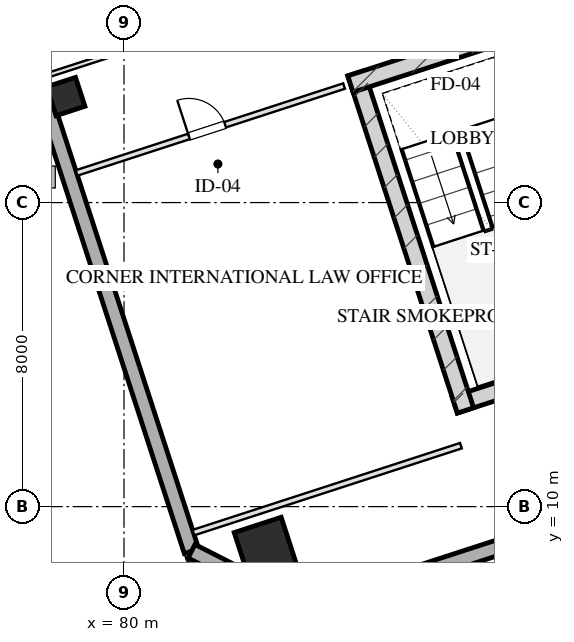
"""IFC4 building model, lengths in metres.
Left out: names, types, materials, properties, quantities, classifications, styles, units other than length and angle.
Written with IfcOpenShell. Run it as: python <this file> out.ifc"""

import sys

from ifc_helpers import new_model, si_unit, direction, frame, frame_2d, origin, origin_2d, place, context, subcontext, project, spatial, rectangle, hollow_rectangle, extrude, element, fill, save


model = new_model("IFC4")
c1 = context("Model", 3, precision=1e-05, world=origin(), true_north=direction((0.0, 1.0)))
c2 = subcontext(c1, "Body", "Model", "MODEL_VIEW")
j1 = project(units=[si_unit("LENGTHUNIT", "METRE"), si_unit("PLANEANGLEUNIT", "RADIAN")], contexts=[c1])
p1 = place(None, origin())
s1 = spatial("IfcSite", under=j1, at=p1, CompositionType="ELEMENT")
p2 = place(p1, origin())
s2 = spatial("IfcBuilding", under=s1, at=p2, CompositionType="ELEMENT")
p3 = place(p2, frame((0.0, 0.0, 195.5)))
s3 = spatial("IfcBuildingStorey", under=s2, at=p3, CompositionType="ELEMENT", Elevation=195.5)
p4 = place(p3, frame((88.701, 12.675, 0.0), z_axis=(0.0, 0.0, 1.0), x_axis=(0.95105824505, 0.309011673763, 0.0)))
e1 = element("IfcWall", 1, at=p4, inside=s3, PredefinedType="SHEAR", context=c2, shape_type="SweptSolid", body=[
    extrude(rectangle(XDim=16.25, YDim=0.45, at=frame_2d((8.125, 0.0))), origin(), (0.0, 0.0, 1.0), 3.45),
])
p5 = place(p3, frame((86.102, 21.404, 0.0), z_axis=(0.0, 0.0, 1.0), x_axis=(0.309035778627, -0.951050412717, 0.0)))
e2 = element("IfcWall", 2, at=p5, inside=s3, PredefinedType="SHEAR", context=c2, shape_type="SweptSolid", body=[
    extrude(rectangle(XDim=9.33, YDim=0.45, at=frame_2d((4.665, 0.0))), origin(), (0.0, 0.0, 1.0), 3.45),
])
p6 = place(p3, frame((85.957, 21.12, 0.0), z_axis=(0.0, 0.0, 1.0), x_axis=(0.951064796122, 0.308991510526, 0.0)))
e3 = element("IfcWall", 3, at=p6, inside=s3, PredefinedType="SHEAR", context=c2, shape_type="SweptSolid", body=[
    extrude(rectangle(XDim=4.145, YDim=0.45, at=frame_2d((2.073, 0.0))), origin(), (0.0, 0.0, 1.0), 3.45),
])
p7 = place(p3, frame((83.719, 8.901, 0.0), z_axis=(0.0, 0.0, 1.0), x_axis=(0.951056516295, 0.309016994375, 0.0)))
e4 = element("IfcColumn", 4, at=p7, inside=s3, PredefinedType="COLUMN", context=c2, shape_type="SweptSolid", body=[
    extrude(hollow_rectangle(XDim=1.3, YDim=1.3, WallThickness=0.045, at=origin_2d()), origin(), (0.0, 0.0, 1.0), 3.451),
])
p8 = place(p3, frame((78.468, 20.79, 0.0), z_axis=(0.0, 0.0, 1.0), x_axis=(0.951056516295, 0.309016994375, 0.0)))
e5 = element("IfcColumn", 5, at=p8, inside=s3, PredefinedType="COLUMN", context=c2, shape_type="SweptSolid", body=[
    extrude(hollow_rectangle(XDim=0.8, YDim=0.8, WallThickness=0.028, at=origin_2d()), origin(), (0.0, 0.0, 1.0), 3.451),
])
p9 = place(p3, frame((81.776, 8.827, 0.0), z_axis=(0.0, 0.0, 1.0), x_axis=(-0.309014228706, 0.951057414911, 0.0)))
e6 = element("IfcWall", 6, at=p9, inside=s3, PredefinedType="SOLIDWALL", context=c2, shape_type="SweptSolid", body=[
    extrude(rectangle(XDim=42.8, YDim=0.4, at=frame_2d((21.4, 0.0))), origin(), (0.0, 0.0, 1.0), 2.61),
])
p10 = place(p9, frame((22.95, 0.0, 0.75)))
e7 = element("IfcOpeningElement", 7, at=p10, cuts=e6, PredefinedType="OPENING", context=c2, shape_type="SweptSolid", body=[
    extrude(rectangle(XDim=2.1, YDim=1.46, at=frame_2d((1.05, 0.73))), frame((0.0, 0.21, 0.0), z_axis=(0.0, -1.0, 0.0), x_axis=(1.0, 0.0, 0.0)), (0.0, 0.0, 1.0), 0.42),
])
p11 = place(p9, frame((26.75, 0.0, 0.75)))
e8 = element("IfcOpeningElement", 8, at=p11, cuts=e6, PredefinedType="OPENING", context=c2, shape_type="SweptSolid", body=[
    extrude(rectangle(XDim=2.1, YDim=1.46, at=frame_2d((1.05, 0.73))), frame((0.0, 0.21, 0.0), z_axis=(0.0, -1.0, 0.0), x_axis=(1.0, 0.0, 0.0)), (0.0, 0.0, 1.0), 0.42),
])
p12 = place(p9, frame((17.787, 0.0, 0.0)))
e9 = element("IfcOpeningElement", 9, at=p12, cuts=e6, PredefinedType="OPENING", context=c2, shape_type="SweptSolid", body=[
    extrude(rectangle(XDim=1.1, YDim=2.15, at=frame_2d((0.55, 1.075))), frame((0.0, 0.21, 0.0), z_axis=(0.0, -1.0, 0.0), x_axis=(1.0, 0.0, 0.0)), (0.0, 0.0, 1.0), 0.42),
])
p13 = place(p3, frame((109.908, 15.444, 0.0), z_axis=(0.0, 0.0, 1.0), x_axis=(-0.951057580055, -0.30901372044, 0.0)))
e10 = element("IfcWall", 10, at=p13, inside=s3, PredefinedType="SOLIDWALL", context=c2, shape_type="SweptSolid", body=[
    extrude(rectangle(XDim=26.4, YDim=0.4, at=frame_2d((13.2, 0.0))), origin(), (0.0, 0.0, 1.0), 2.61),
])
p14 = place(p3, frame((84.801, 7.286, 0.0), z_axis=(0.0, 0.0, 1.0), x_axis=(-0.891020832027, 0.453962417932, 0.0)))
e11 = element("IfcWall", 11, at=p14, inside=s3, PredefinedType="SOLIDWALL", context=c2, shape_type="SweptSolid", body=[
    extrude(rectangle(XDim=3.394, YDim=0.4, at=frame_2d((1.697, 0.0))), origin(), (0.0, 0.0, 1.0), 2.61),
])
p15 = place(p3, frame((81.828, 9.316, 0.0), z_axis=(0.0, 0.0, 1.0), x_axis=(0.95105128112, 0.309033106124, 0.0)))
e12 = element("IfcWall", 12, at=p15, inside=s3, PredefinedType="PARTITIONING", context=c2, shape_type="SweptSolid", body=[
    extrude(rectangle(XDim=7.4, YDim=0.15, at=frame_2d((3.7, 0.0))), origin(), (0.0, 0.0, 1.0), 3.175),
])
p16 = place(p3, frame((78.753, 18.78, 0.0), z_axis=(0.0, 0.0, 1.0), x_axis=(0.951060977215, 0.309003264738, 0.0)))
e13 = element("IfcWall", 13, at=p16, inside=s3, PredefinedType="PARTITIONING", context=c2, shape_type="SweptSolid", body=[
    extrude(rectangle(XDim=7.4, YDim=0.15, at=frame_2d((3.7, 0.0))), origin(), (0.0, 0.0, 1.0), 2.15),
])
p17 = place(p16, frame((3.108, 0.0, 0.0)))
e14 = element("IfcOpeningElement", 14, at=p17, cuts=e13, PredefinedType="OPENING", context=c2, shape_type="SweptSolid", body=[
    extrude(rectangle(XDim=1.0, YDim=2.05, at=frame_2d((0.5, 1.025))), frame((0.0, 0.085, 0.0), z_axis=(0.0, -1.0, 0.0), x_axis=(1.0, 0.0, 0.0)), (0.0, 0.0, 1.0), 0.17),
])
p18 = place(p3, frame((77.925, 21.328, 0.0), z_axis=(0.0, 0.0, 1.0), x_axis=(0.951053980838, 0.309024797601, 0.0)))
e15 = element("IfcWall", 15, at=p18, inside=s3, PredefinedType="PARTITIONING", context=c2, shape_type="SweptSolid", body=[
    extrude(rectangle(XDim=9.55, YDim=0.12, at=frame_2d((4.775, 0.0))), origin(), (0.0, 0.0, 1.0), 3.175),
])
p19 = place(p17, origin())
e16 = element("IfcDoor", 16, at=p19, inside=s3, OperationType="SINGLE_SWING_LEFT", PredefinedType="DOOR", context=c2, shape_type="SweptSolid", body=[
    extrude(rectangle(XDim=1.0, YDim=2.05, at=frame_2d((0.5, 1.025))), frame((0.0, 0.025, 0.0), z_axis=(0.0, -1.0, 0.0), x_axis=(1.0, 0.0, 0.0)), (0.0, 0.0, 1.0), 0.05),
])
fill(e14, e16)
save(model, sys.argv[1])
